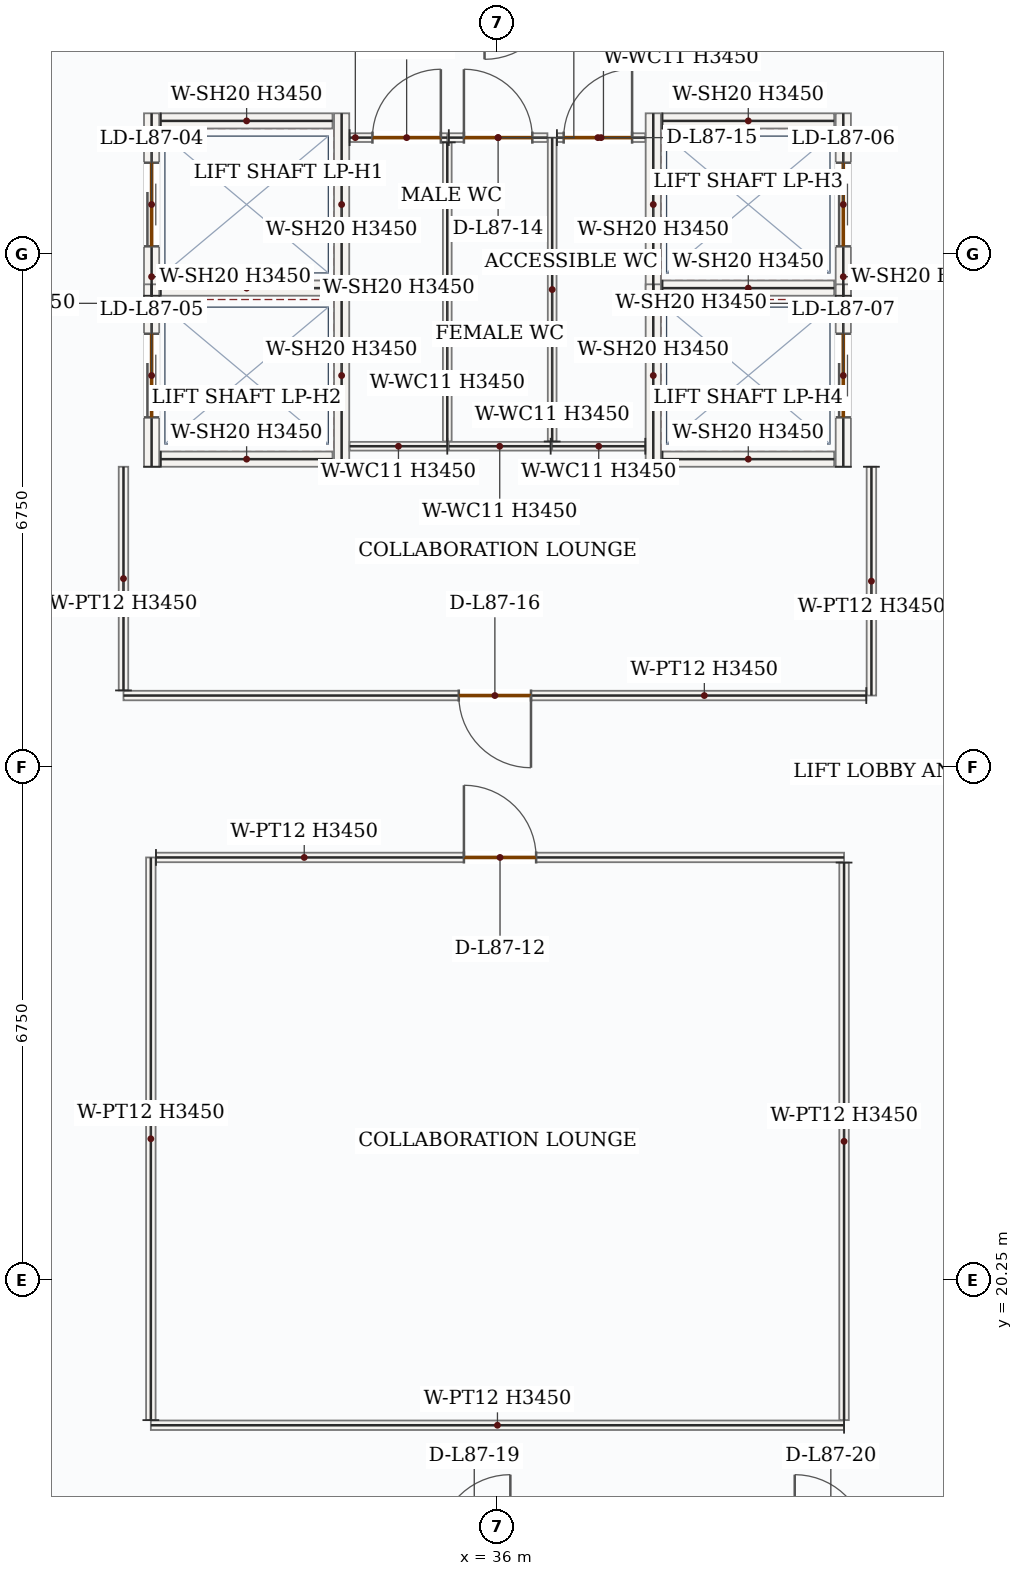
"""IFC4 building model, lengths in metres.
Left out: names, types, materials, properties, quantities, classifications, styles, units other than length and angle.
Written with IfcOpenShell. Run it as: python <this file> out.ifc"""

import sys

from ifc_helpers import new_model, si_unit, direction, frame, frame_2d, origin, place, context, subcontext, project, spatial, rectangle, extrude, source, transform, mapped, element, fill, save


model = new_model("IFC4")
c1 = context("Model", 3, precision=1e-05, world=origin(), true_north=direction((0.0, 1.0)))
c2 = subcontext(c1, "Body", "Model", "MODEL_VIEW")
j1 = project(units=[si_unit("LENGTHUNIT", "METRE"), si_unit("PLANEANGLEUNIT", "RADIAN")], contexts=[c1])
p1 = place(None, origin())
s1 = spatial("IfcSite", under=j1, at=p1, CompositionType="ELEMENT")
p2 = place(p1, origin())
s2 = spatial("IfcBuilding", under=s1, at=p2, CompositionType="ELEMENT")
p3 = place(p2, frame((0.0, 0.0, 357.3)))
s3 = spatial("IfcBuildingStorey", under=s2, at=p3, CompositionType="ELEMENT", Elevation=357.3)
p4 = place(p3, frame((31.45, 33.2, 0.0), z_axis=(0.0, 0.0, 1.0), x_axis=(0.0, 1.0, 0.0)))
e1 = element("IfcWall", 1, at=p4, inside=s3, PredefinedType="SOLIDWALL", context=c2, shape_type="SweptSolid", body=[
    extrude(rectangle(XDim=2.4, YDim=0.2, at=frame_2d((1.2, 0.0))), origin(), (0.0, 0.0, 1.0), 3.45),
])
p5 = place(p4, frame((0.65, 0.0, 0.0)))
e2 = element("IfcOpeningElement", 2, at=p5, cuts=e1, PredefinedType="OPENING", context=c2, shape_type="SweptSolid", body=[
    extrude(rectangle(XDim=1.1, YDim=2.15, at=frame_2d((0.55, 1.075))), frame((0.0, 0.11, 0.0), z_axis=(0.0, -1.0, 0.0), x_axis=(1.0, 0.0, 0.0)), (0.0, 0.0, 1.0), 0.22),
])
m1 = source(origin(), c2, "Body", "SweptSolid", [
    extrude(rectangle(XDim=2.4, YDim=0.2, at=frame_2d((1.2, 0.0))), origin(), (0.0, 0.0, 1.0), 3.45),
])
p6 = place(p3, frame((33.95, 33.2, 0.0), z_axis=(0.0, 0.0, 1.0), x_axis=(0.0, 1.0, 0.0)))
e3 = element("IfcWall", 3, at=p6, inside=s3, PredefinedType="SOLIDWALL", context=c2, shape_type="MappedRepresentation", body=[
    mapped(m1, transform((0.0, 0.0, 0.0), x_axis=(1.0, 0.0, 0.0), y_axis=(0.0, 1.0, 0.0), z_axis=(0.0, 0.0, 1.0), scale=1.0)),
])
m2 = source(origin(), c2, "Body", "SweptSolid", [
    extrude(rectangle(XDim=2.26, YDim=0.2, at=frame_2d((1.13, 0.0))), origin(), (0.0, 0.0, 1.0), 3.45),
])
for number, where, z_axis, x_axis in (
    (4, (31.57, 33.3, 0.0), (0.0, 0.0, 1.0), (1.0, 0.0, 0.0)),
    (5, (31.57, 35.5, 0.0), (0.0, 0.0, 1.0), (1.0, 0.0, 0.0)),
):
    element("IfcWall", number, at=place(p3, frame(where, z_axis=z_axis, x_axis=x_axis)), inside=s3, PredefinedType="SOLIDWALL", context=c2, shape_type="MappedRepresentation", body=[
        mapped(m2, transform((0.0, 0.0, 0.0), x_axis=(1.0, 0.0, 0.0), y_axis=(0.0, 1.0, 0.0), z_axis=(0.0, 0.0, 1.0), scale=1.0)),
    ])
p7 = place(p3, frame((31.45, 30.95, 0.0), z_axis=(0.0, 0.0, 1.0), x_axis=(0.0, 1.0, 0.0)))
e6 = element("IfcWall", 6, at=p7, inside=s3, PredefinedType="SOLIDWALL", context=c2, shape_type="SweptSolid", body=[
    extrude(rectangle(XDim=2.4, YDim=0.2, at=frame_2d((1.2, 0.0))), origin(), (0.0, 0.0, 1.0), 3.45),
])
p8 = place(p7, frame((0.65, 0.0, 0.0)))
e7 = element("IfcOpeningElement", 7, at=p8, cuts=e6, PredefinedType="OPENING", context=c2, shape_type="SweptSolid", body=[
    extrude(rectangle(XDim=1.1, YDim=2.15, at=frame_2d((0.55, 1.075))), frame((0.0, 0.11, 0.0), z_axis=(0.0, -1.0, 0.0), x_axis=(1.0, 0.0, 0.0)), (0.0, 0.0, 1.0), 0.22),
])
p9 = place(p3, frame((33.95, 30.95, 0.0), z_axis=(0.0, 0.0, 1.0), x_axis=(0.0, 1.0, 0.0)))
e8 = element("IfcWall", 8, at=p9, inside=s3, PredefinedType="SOLIDWALL", context=c2, shape_type="MappedRepresentation", body=[
    mapped(m1, transform((0.0, 0.0, 0.0), x_axis=(1.0, 0.0, 0.0), y_axis=(0.0, 1.0, 0.0), z_axis=(0.0, 0.0, 1.0), scale=1.0)),
])
p10 = place(p3, frame((31.57, 31.05, 0.0), z_axis=(0.0, 0.0, 1.0), x_axis=(1.0, 0.0, 0.0)))
e9 = element("IfcWall", 9, at=p10, inside=s3, PredefinedType="SOLIDWALL", context=c2, shape_type="MappedRepresentation", body=[
    mapped(m2, transform((0.0, 0.0, 0.0), x_axis=(1.0, 0.0, 0.0), y_axis=(0.0, 1.0, 0.0), z_axis=(0.0, 0.0, 1.0), scale=1.0)),
])
p11 = place(p3, frame((38.05, 33.2, 0.0), z_axis=(0.0, 0.0, 1.0), x_axis=(0.0, 1.0, 0.0)))
e10 = element("IfcWall", 10, at=p11, inside=s3, PredefinedType="SOLIDWALL", context=c2, shape_type="MappedRepresentation", body=[
    mapped(m1, transform((0.0, 0.0, 0.0), x_axis=(1.0, 0.0, 0.0), y_axis=(0.0, 1.0, 0.0), z_axis=(0.0, 0.0, 1.0), scale=1.0)),
])
p12 = place(p3, frame((40.55, 33.2, 0.0), z_axis=(0.0, 0.0, 1.0), x_axis=(0.0, 1.0, 0.0)))
e11 = element("IfcWall", 11, at=p12, inside=s3, PredefinedType="SOLIDWALL", context=c2, shape_type="SweptSolid", body=[
    extrude(rectangle(XDim=2.4, YDim=0.2, at=frame_2d((1.2, 0.0))), origin(), (0.0, 0.0, 1.0), 3.45),
])
p13 = place(p12, frame((0.65, 0.0, 0.0)))
e12 = element("IfcOpeningElement", 12, at=p13, cuts=e11, PredefinedType="OPENING", context=c2, shape_type="SweptSolid", body=[
    extrude(rectangle(XDim=1.1, YDim=2.15, at=frame_2d((0.55, 1.075))), frame((0.0, 0.11, 0.0), z_axis=(0.0, -1.0, 0.0), x_axis=(1.0, 0.0, 0.0)), (0.0, 0.0, 1.0), 0.22),
])
for number, where, z_axis, x_axis in (
    (13, (38.17, 33.3, 0.0), (0.0, 0.0, 1.0), (1.0, 0.0, 0.0)),
    (14, (38.17, 35.5, 0.0), (0.0, 0.0, 1.0), (1.0, 0.0, 0.0)),
):
    element("IfcWall", number, at=place(p3, frame(where, z_axis=z_axis, x_axis=x_axis)), inside=s3, PredefinedType="SOLIDWALL", context=c2, shape_type="MappedRepresentation", body=[
        mapped(m2, transform((0.0, 0.0, 0.0), x_axis=(1.0, 0.0, 0.0), y_axis=(0.0, 1.0, 0.0), z_axis=(0.0, 0.0, 1.0), scale=1.0)),
    ])
p14 = place(p3, frame((38.05, 30.95, 0.0), z_axis=(0.0, 0.0, 1.0), x_axis=(0.0, 1.0, 0.0)))
e15 = element("IfcWall", 15, at=p14, inside=s3, PredefinedType="SOLIDWALL", context=c2, shape_type="MappedRepresentation", body=[
    mapped(m1, transform((0.0, 0.0, 0.0), x_axis=(1.0, 0.0, 0.0), y_axis=(0.0, 1.0, 0.0), z_axis=(0.0, 0.0, 1.0), scale=1.0)),
])
p15 = place(p3, frame((40.55, 30.95, 0.0), z_axis=(0.0, 0.0, 1.0), x_axis=(0.0, 1.0, 0.0)))
e16 = element("IfcWall", 16, at=p15, inside=s3, PredefinedType="SOLIDWALL", context=c2, shape_type="SweptSolid", body=[
    extrude(rectangle(XDim=2.4, YDim=0.2, at=frame_2d((1.2, 0.0))), origin(), (0.0, 0.0, 1.0), 3.45),
])
p16 = place(p15, frame((0.65, 0.0, 0.0)))
e17 = element("IfcOpeningElement", 17, at=p16, cuts=e16, PredefinedType="OPENING", context=c2, shape_type="SweptSolid", body=[
    extrude(rectangle(XDim=1.1, YDim=2.15, at=frame_2d((0.55, 1.075))), frame((0.0, 0.11, 0.0), z_axis=(0.0, -1.0, 0.0), x_axis=(1.0, 0.0, 0.0)), (0.0, 0.0, 1.0), 0.22),
])
p17 = place(p3, frame((38.17, 31.05, 0.0), z_axis=(0.0, 0.0, 1.0), x_axis=(1.0, 0.0, 0.0)))
e18 = element("IfcWall", 18, at=p17, inside=s3, PredefinedType="SOLIDWALL", context=c2, shape_type="MappedRepresentation", body=[
    mapped(m2, transform((0.0, 0.0, 0.0), x_axis=(1.0, 0.0, 0.0), y_axis=(0.0, 1.0, 0.0), z_axis=(0.0, 0.0, 1.0), scale=1.0)),
])
m3 = source(origin(), c2, "Body", "SweptSolid", [
    extrude(rectangle(XDim=1.225, YDim=0.115, at=frame_2d((0.613, 0.0))), origin(), (0.0, 0.0, 1.0), 3.45),
])
p18 = place(p3, frame((37.945, 31.22, 0.0), z_axis=(0.0, 0.0, 1.0), x_axis=(-1.0, 0.0, 0.0)))
e19 = element("IfcWall", 19, at=p18, inside=s3, PredefinedType="PARTITIONING", context=c2, shape_type="MappedRepresentation", body=[
    mapped(m3, transform((0.0, 0.0, 0.0), x_axis=(1.0, 0.0, 0.0), y_axis=(0.0, 1.0, 0.0), z_axis=(0.0, 0.0, 1.0), scale=1.0)),
])
m4 = source(origin(), c2, "Body", "SweptSolid", [
    extrude(rectangle(XDim=3.998, YDim=0.115, at=frame_2d((1.999, 0.0))), origin(), (0.0, 0.0, 1.0), 3.45),
])
p19 = place(p3, frame((36.72, 31.282, 0.0), z_axis=(0.0, 0.0, 1.0), x_axis=(0.0, 1.0, 0.0)))
e20 = element("IfcWall", 20, at=p19, inside=s3, PredefinedType="PARTITIONING", context=c2, shape_type="MappedRepresentation", body=[
    mapped(m4, transform((0.0, 0.0, 0.0), x_axis=(1.0, 0.0, 0.0), y_axis=(0.0, 1.0, 0.0), z_axis=(0.0, 0.0, 1.0), scale=1.0)),
])
p20 = place(p3, frame((36.782, 35.28, 0.0), z_axis=(0.0, 0.0, 1.0), x_axis=(1.0, 0.0, 0.0)))
e21 = element("IfcWall", 21, at=p20, inside=s3, PredefinedType="PARTITIONING", context=c2, shape_type="SweptSolid", body=[
    extrude(rectangle(XDim=1.163, YDim=0.115, at=frame_2d((0.581, 0.0))), origin(), (0.0, 0.0, 1.0), 3.45),
])
p21 = place(p20, frame((0.089, 0.0, 0.0)))
e22 = element("IfcOpeningElement", 22, at=p21, cuts=e21, PredefinedType="OPENING", context=c2, shape_type="SweptSolid", body=[
    extrude(rectangle(XDim=0.9, YDim=2.1, at=frame_2d((0.45, 1.05))), frame((0.0, 0.067, 0.0), z_axis=(0.0, -1.0, 0.0), x_axis=(1.0, 0.0, 0.0)), (0.0, 0.0, 1.0), 0.135),
])
m5 = source(origin(), c2, "Body", "SweptSolid", [
    extrude(rectangle(XDim=1.285, YDim=0.115, at=frame_2d((0.643, 0.0))), origin(), (0.0, 0.0, 1.0), 3.45),
])
p22 = place(p3, frame((35.34, 31.22, 0.0), z_axis=(0.0, 0.0, 1.0), x_axis=(-1.0, 0.0, 0.0)))
e23 = element("IfcWall", 23, at=p22, inside=s3, PredefinedType="PARTITIONING", context=c2, shape_type="MappedRepresentation", body=[
    mapped(m5, transform((0.0, 0.0, 0.0), x_axis=(1.0, 0.0, 0.0), y_axis=(0.0, 1.0, 0.0), z_axis=(0.0, 0.0, 1.0), scale=1.0)),
])
p23 = place(p3, frame((34.055, 35.28, 0.0), z_axis=(0.0, 0.0, 1.0), x_axis=(1.0, 0.0, 0.0)))
e24 = element("IfcWall", 24, at=p23, inside=s3, PredefinedType="PARTITIONING", context=c2, shape_type="SweptSolid", body=[
    extrude(rectangle(XDim=1.285, YDim=0.115, at=frame_2d((0.643, 0.0))), origin(), (0.0, 0.0, 1.0), 3.45),
])
p24 = place(p23, frame((0.3, 0.0, 0.0)))
e25 = element("IfcOpeningElement", 25, at=p24, cuts=e24, PredefinedType="OPENING", context=c2, shape_type="SweptSolid", body=[
    extrude(rectangle(XDim=0.9, YDim=2.1, at=frame_2d((0.45, 1.05))), frame((0.0, 0.067, 0.0), z_axis=(0.0, -1.0, 0.0), x_axis=(1.0, 0.0, 0.0)), (0.0, 0.0, 1.0), 0.135),
])
m6 = source(origin(), c2, "Body", "SweptSolid", [
    extrude(rectangle(XDim=3.935, YDim=0.115, at=frame_2d((1.968, 0.0))), origin(), (0.0, 0.0, 1.0), 3.45),
])
p25 = place(p3, frame((35.34, 35.218, 0.0), z_axis=(0.0, 0.0, 1.0), x_axis=(0.0, -1.0, 0.0)))
e26 = element("IfcWall", 26, at=p25, inside=s3, PredefinedType="PARTITIONING", context=c2, shape_type="MappedRepresentation", body=[
    mapped(m6, transform((0.0, 0.0, 0.0), x_axis=(1.0, 0.0, 0.0), y_axis=(0.0, 1.0, 0.0), z_axis=(0.0, 0.0, 1.0), scale=1.0)),
])
m7 = source(origin(), c2, "Body", "SweptSolid", [
    extrude(rectangle(XDim=1.34, YDim=0.115, at=frame_2d((0.67, 0.0))), origin(), (0.0, 0.0, 1.0), 3.45),
])
p26 = place(p3, frame((36.7, 31.22, 0.0), z_axis=(0.0, 0.0, 1.0), x_axis=(-1.0, 0.0, 0.0)))
e27 = element("IfcWall", 27, at=p26, inside=s3, PredefinedType="PARTITIONING", context=c2, shape_type="MappedRepresentation", body=[
    mapped(m7, transform((0.0, 0.0, 0.0), x_axis=(1.0, 0.0, 0.0), y_axis=(0.0, 1.0, 0.0), z_axis=(0.0, 0.0, 1.0), scale=1.0)),
])
p27 = place(p3, frame((35.36, 35.28, 0.0), z_axis=(0.0, 0.0, 1.0), x_axis=(1.0, 0.0, 0.0)))
e28 = element("IfcWall", 28, at=p27, inside=s3, PredefinedType="PARTITIONING", context=c2, shape_type="SweptSolid", body=[
    extrude(rectangle(XDim=1.297, YDim=0.115, at=frame_2d((0.649, 0.0))), origin(), (0.0, 0.0, 1.0), 3.45),
])
p28 = place(p27, frame((0.199, 0.0, 0.0)))
e29 = element("IfcOpeningElement", 29, at=p28, cuts=e28, PredefinedType="OPENING", context=c2, shape_type="SweptSolid", body=[
    extrude(rectangle(XDim=0.9, YDim=2.1, at=frame_2d((0.45, 1.05))), frame((0.0, 0.067, 0.0), z_axis=(0.0, -1.0, 0.0), x_axis=(1.0, 0.0, 0.0)), (0.0, 0.0, 1.0), 0.135),
])
m8 = source(origin(), c2, "Body", "SweptSolid", [
    extrude(rectangle(XDim=3.01, YDim=0.125, at=frame_2d((1.505, 0.0))), origin(), (0.0, 0.0, 1.0), 3.45),
])
p29 = place(p3, frame((40.92, 30.95, 0.0), z_axis=(0.0, 0.0, 1.0), x_axis=(0.0, -1.0, 0.0)))
e30 = element("IfcWall", 30, at=p29, inside=s3, PredefinedType="PARTITIONING", context=c2, shape_type="MappedRepresentation", body=[
    mapped(m8, transform((0.0, 0.0, 0.0), x_axis=(1.0, 0.0, 0.0), y_axis=(0.0, 1.0, 0.0), z_axis=(0.0, 0.0, 1.0), scale=1.0)),
])
p30 = place(p3, frame((40.853, 27.94, 0.0), z_axis=(0.0, 0.0, 1.0), x_axis=(-1.0, 0.0, 0.0)))
e31 = element("IfcWall", 31, at=p30, inside=s3, PredefinedType="PARTITIONING", context=c2, shape_type="SweptSolid", body=[
    extrude(rectangle(XDim=9.772, YDim=0.125, at=frame_2d((4.886, 0.0))), origin(), (0.0, 0.0, 1.0), 3.45),
])
p31 = place(p30, frame((4.411, 0.0, 0.0)))
e32 = element("IfcOpeningElement", 32, at=p31, cuts=e31, PredefinedType="OPENING", context=c2, shape_type="SweptSolid", body=[
    extrude(rectangle(XDim=0.95, YDim=2.15, at=frame_2d((0.475, 1.075))), frame((0.0, 0.073, 0.0), z_axis=(0.0, -1.0, 0.0), x_axis=(1.0, 0.0, 0.0)), (0.0, 0.0, 1.0), 0.145),
])
m9 = source(origin(), c2, "Body", "SweptSolid", [
    extrude(rectangle(XDim=2.942, YDim=0.125, at=frame_2d((1.471, 0.0))), origin(), (0.0, 0.0, 1.0), 3.45),
])
p32 = place(p3, frame((31.08, 28.008, 0.0), z_axis=(0.0, 0.0, 1.0), x_axis=(0.0, 1.0, 0.0)))
e33 = element("IfcWall", 33, at=p32, inside=s3, PredefinedType="PARTITIONING", context=c2, shape_type="MappedRepresentation", body=[
    mapped(m9, transform((0.0, 0.0, 0.0), x_axis=(1.0, 0.0, 0.0), y_axis=(0.0, 1.0, 0.0), z_axis=(0.0, 0.0, 1.0), scale=1.0)),
])
m10 = source(origin(), c2, "Body", "SweptSolid", [
    extrude(rectangle(XDim=9.12, YDim=0.125, at=frame_2d((4.56, 0.0))), origin(), (0.0, 0.0, 1.0), 3.45),
])
p33 = place(p3, frame((40.56, 18.34, 0.0), z_axis=(0.0, 0.0, 1.0), x_axis=(-1.0, 0.0, 0.0)))
e34 = element("IfcWall", 34, at=p33, inside=s3, PredefinedType="PARTITIONING", context=c2, shape_type="MappedRepresentation", body=[
    mapped(m10, transform((0.0, 0.0, 0.0), x_axis=(1.0, 0.0, 0.0), y_axis=(0.0, 1.0, 0.0), z_axis=(0.0, 0.0, 1.0), scale=1.0)),
])
m11 = source(origin(), c2, "Body", "SweptSolid", [
    extrude(rectangle(XDim=7.403, YDim=0.125, at=frame_2d((3.701, 0.0))), origin(), (0.0, 0.0, 1.0), 3.45),
])
p34 = place(p3, frame((31.44, 18.407, 0.0), z_axis=(0.0, 0.0, 1.0), x_axis=(0.0, 1.0, 0.0)))
e35 = element("IfcWall", 35, at=p34, inside=s3, PredefinedType="PARTITIONING", context=c2, shape_type="MappedRepresentation", body=[
    mapped(m11, transform((0.0, 0.0, 0.0), x_axis=(1.0, 0.0, 0.0), y_axis=(0.0, 1.0, 0.0), z_axis=(0.0, 0.0, 1.0), scale=1.0)),
])
p35 = place(p3, frame((31.508, 25.81, 0.0), z_axis=(0.0, 0.0, 1.0), x_axis=(1.0, 0.0, 0.0)))
e36 = element("IfcWall", 36, at=p35, inside=s3, PredefinedType="PARTITIONING", context=c2, shape_type="SweptSolid", body=[
    extrude(rectangle(XDim=9.052, YDim=0.125, at=frame_2d((4.526, 0.0))), origin(), (0.0, 0.0, 1.0), 3.45),
])
p36 = place(p35, frame((4.051, 0.0, 0.0)))
e37 = element("IfcOpeningElement", 37, at=p36, cuts=e36, PredefinedType="OPENING", context=c2, shape_type="SweptSolid", body=[
    extrude(rectangle(XDim=0.95, YDim=2.15, at=frame_2d((0.475, 1.075))), frame((0.0, 0.073, 0.0), z_axis=(0.0, -1.0, 0.0), x_axis=(1.0, 0.0, 0.0)), (0.0, 0.0, 1.0), 0.145),
])
m12 = source(origin(), c2, "Body", "SweptSolid", [
    extrude(rectangle(XDim=7.335, YDim=0.125, at=frame_2d((3.667, 0.0))), origin(), (0.0, 0.0, 1.0), 3.45),
])
p37 = place(p3, frame((40.56, 25.742, 0.0), z_axis=(0.0, 0.0, 1.0), x_axis=(0.0, -1.0, 0.0)))
e38 = element("IfcWall", 38, at=p37, inside=s3, PredefinedType="PARTITIONING", context=c2, shape_type="MappedRepresentation", body=[
    mapped(m12, transform((0.0, 0.0, 0.0), x_axis=(1.0, 0.0, 0.0), y_axis=(0.0, 1.0, 0.0), z_axis=(0.0, 0.0, 1.0), scale=1.0)),
])
m13 = source(origin(), c2, "Body", "SweptSolid", [
    extrude(rectangle(XDim=1.1, YDim=2.15, at=frame_2d((0.55, 1.075))), frame((0.0, 0.025, 0.0), z_axis=(0.0, -1.0, 0.0), x_axis=(1.0, 0.0, 0.0)), (0.0, 0.0, 1.0), 0.05),
])
p38 = place(p5, origin())
e39 = element("IfcDoor", 39, at=p38, inside=s3, OperationType="DOUBLE_DOOR_SLIDING", PredefinedType="DOOR", context=c2, shape_type="MappedRepresentation", body=[
    mapped(m13, transform((0.0, 0.0, 0.0), x_axis=(1.0, 0.0, 0.0), y_axis=(0.0, 1.0, 0.0), z_axis=(0.0, 0.0, 1.0), scale=1.0)),
])
fill(e2, e39)
p39 = place(p8, origin())
e40 = element("IfcDoor", 40, at=p39, inside=s3, OperationType="DOUBLE_DOOR_SLIDING", PredefinedType="DOOR", context=c2, shape_type="MappedRepresentation", body=[
    mapped(m13, transform((0.0, 0.0, 0.0), x_axis=(1.0, 0.0, 0.0), y_axis=(0.0, 1.0, 0.0), z_axis=(0.0, 0.0, 1.0), scale=1.0)),
])
fill(e7, e40)
p40 = place(p13, origin())
e41 = element("IfcDoor", 41, at=p40, inside=s3, OperationType="DOUBLE_DOOR_SLIDING", PredefinedType="DOOR", context=c2, shape_type="MappedRepresentation", body=[
    mapped(m13, transform((0.0, 0.0, 0.0), x_axis=(1.0, 0.0, 0.0), y_axis=(0.0, 1.0, 0.0), z_axis=(0.0, 0.0, 1.0), scale=1.0)),
])
fill(e12, e41)
p41 = place(p16, origin())
e42 = element("IfcDoor", 42, at=p41, inside=s3, OperationType="DOUBLE_DOOR_SLIDING", PredefinedType="DOOR", context=c2, shape_type="MappedRepresentation", body=[
    mapped(m13, transform((0.0, 0.0, 0.0), x_axis=(1.0, 0.0, 0.0), y_axis=(0.0, 1.0, 0.0), z_axis=(0.0, 0.0, 1.0), scale=1.0)),
])
fill(e17, e42)
m14 = source(origin(), c2, "Body", "SweptSolid", [
    extrude(rectangle(XDim=0.95, YDim=2.15, at=frame_2d((0.475, 1.075))), frame((0.0, 0.025, 0.0), z_axis=(0.0, -1.0, 0.0), x_axis=(1.0, 0.0, 0.0)), (0.0, 0.0, 1.0), 0.05),
])
p42 = place(p36, origin())
e43 = element("IfcDoor", 43, at=p42, inside=s3, OperationType="SINGLE_SWING_LEFT", PredefinedType="DOOR", context=c2, shape_type="MappedRepresentation", body=[
    mapped(m14, transform((0.0, 0.0, 0.0), x_axis=(1.0, 0.0, 0.0), y_axis=(0.0, 1.0, 0.0), z_axis=(0.0, 0.0, 1.0), scale=1.0)),
])
fill(e37, e43)
m15 = source(origin(), c2, "Body", "SweptSolid", [
    extrude(rectangle(XDim=0.9, YDim=2.1, at=frame_2d((0.45, 1.05))), frame((0.0, 0.025, 0.0), z_axis=(0.0, -1.0, 0.0), x_axis=(1.0, 0.0, 0.0)), (0.0, 0.0, 1.0), 0.05),
])
p43 = place(p24, origin())
e44 = element("IfcDoor", 44, at=p43, inside=s3, OperationType="SINGLE_SWING_RIGHT", PredefinedType="DOOR", context=c2, shape_type="MappedRepresentation", body=[
    mapped(m15, transform((0.0, 0.0, 0.0), x_axis=(1.0, 0.0, 0.0), y_axis=(0.0, 1.0, 0.0), z_axis=(0.0, 0.0, 1.0), scale=1.0)),
])
fill(e25, e44)
p44 = place(p28, origin())
e45 = element("IfcDoor", 45, at=p44, inside=s3, OperationType="SINGLE_SWING_LEFT", PredefinedType="DOOR", context=c2, shape_type="MappedRepresentation", body=[
    mapped(m15, transform((0.0, 0.0, 0.0), x_axis=(1.0, 0.0, 0.0), y_axis=(0.0, 1.0, 0.0), z_axis=(0.0, 0.0, 1.0), scale=1.0)),
])
fill(e29, e45)
p45 = place(p21, origin())
e46 = element("IfcDoor", 46, at=p45, inside=s3, OperationType="SINGLE_SWING_RIGHT", PredefinedType="DOOR", context=c2, shape_type="MappedRepresentation", body=[
    mapped(m15, transform((0.0, 0.0, 0.0), x_axis=(1.0, 0.0, 0.0), y_axis=(0.0, 1.0, 0.0), z_axis=(0.0, 0.0, 1.0), scale=1.0)),
])
fill(e22, e46)
p46 = place(p31, origin())
e47 = element("IfcDoor", 47, at=p46, inside=s3, OperationType="SINGLE_SWING_LEFT", PredefinedType="DOOR", context=c2, shape_type="MappedRepresentation", body=[
    mapped(m14, transform((0.0, 0.0, 0.0), x_axis=(1.0, 0.0, 0.0), y_axis=(0.0, 1.0, 0.0), z_axis=(0.0, 0.0, 1.0), scale=1.0)),
])
fill(e32, e47)
save(model, sys.argv[1])
